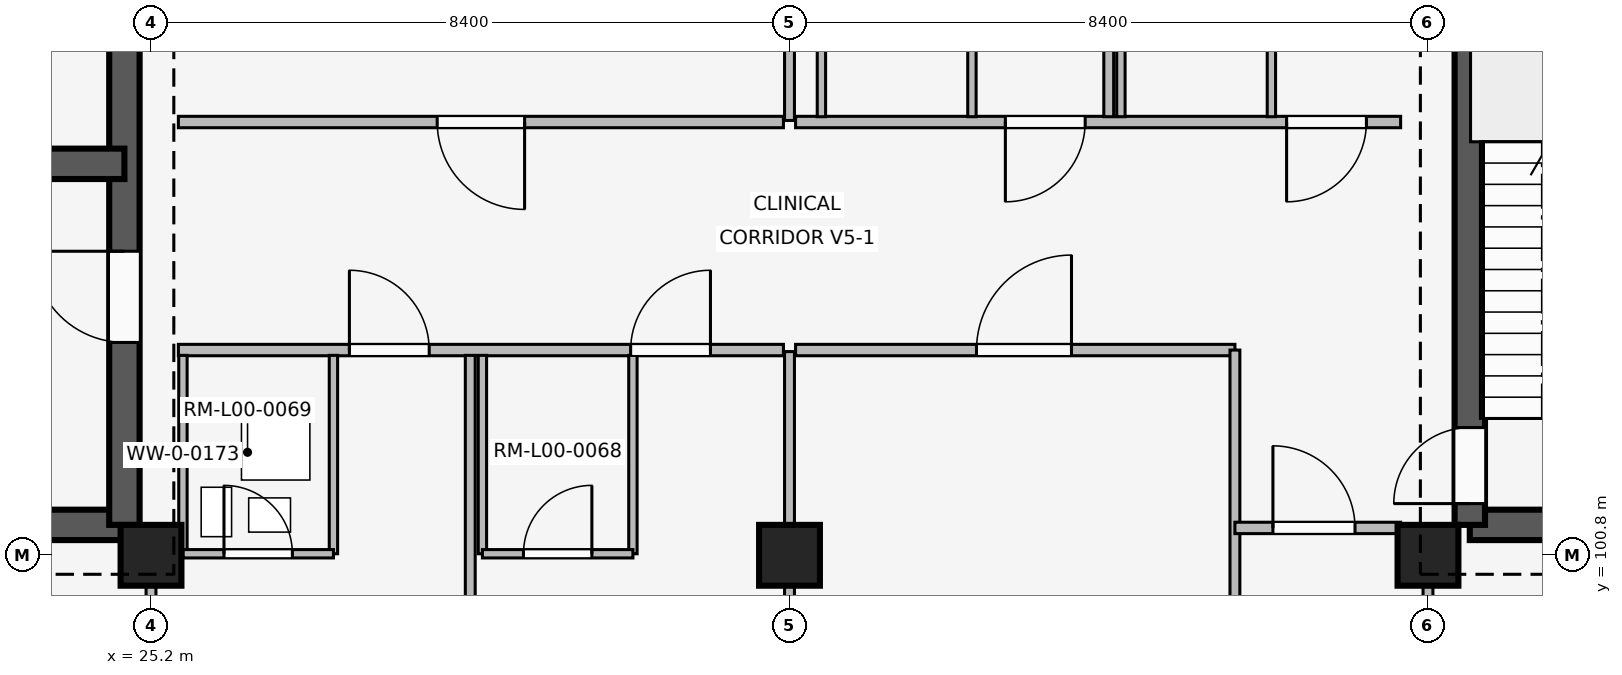
"""IFC4 building model, lengths in metres.
Left out: names, types, materials, properties, quantities, classifications, styles, units other than length and angle.
Written with IfcOpenShell. Run it as: python <this file> out.ifc"""

import sys

from ifc_helpers import new_model, si_unit, direction, frame, frame_2d, origin, origin_2d, place, context, subcontext, project, spatial, rectangle, extrude, element, fill, save


model = new_model("IFC4")
c1 = context("Model", 3, precision=1e-05, world=origin(), true_north=direction((0.0, 1.0)))
c2 = subcontext(c1, "Body", "Model", "MODEL_VIEW")
j1 = project(units=[si_unit("LENGTHUNIT", "METRE"), si_unit("PLANEANGLEUNIT", "RADIAN")], contexts=[c1])
p1 = place(None, origin())
s1 = spatial("IfcSite", under=j1, at=p1, CompositionType="ELEMENT")
p2 = place(p1, origin())
s2 = spatial("IfcBuilding", under=s1, at=p2, CompositionType="ELEMENT")
p3 = place(p2, origin())
s3 = spatial("IfcBuildingStorey", under=s2, at=p3, CompositionType="ELEMENT", Elevation=0.0)
for number, where, z_axis, x_axis in (
    (1, (25.2, 100.8, 0.0), (0.0, 0.0, 1.0), (1.0, 0.0, 0.0)),
    (2, (33.6, 100.8, 0.0), (0.0, 0.0, 1.0), (1.0, 0.0, 0.0)),
    (3, (42.0, 100.8, 0.0), (0.0, 0.0, 1.0), (1.0, 0.0, 0.0)),
):
    element("IfcColumn", number, at=place(p3, frame(where, z_axis=z_axis, x_axis=x_axis)), inside=s3, PredefinedType="COLUMN", context=c2, shape_type="SweptSolid", body=[
        extrude(rectangle(XDim=0.8, YDim=0.8, at=origin_2d()), origin(), (0.0, 0.0, 1.0), 4.8),
    ])
p4 = place(p3, frame((42.55, 101.2, 0.0), z_axis=(0.0, 0.0, 1.0), x_axis=(1.0, 0.0, 0.0)))
e4 = element("IfcWall", 4, at=p4, inside=s3, PredefinedType="SHEAR", context=c2, shape_type="SweptSolid", body=[
    extrude(rectangle(XDim=7.5, YDim=0.4, at=frame_2d((3.75, 0.0))), origin(), (0.0, 0.0, 1.0), 4.52),
])
p5 = place(p4, frame((4.85, 0.0, 0.0)))
e5 = element("IfcOpeningElement", 5, at=p5, cuts=e4, PredefinedType="OPENING", context=c2, shape_type="SweptSolid", body=[
    extrude(rectangle(XDim=1.2, YDim=2.2, at=frame_2d((0.6, 1.1))), frame((0.0, 0.21, 0.0), z_axis=(0.0, -1.0, 0.0), x_axis=(1.0, 0.0, 0.0)), (0.0, 0.0, 1.0), 0.42),
])
p6 = place(p3, frame((42.55, 101.2, 0.0), z_axis=(0.0, 0.0, 1.0), x_axis=(0.0, 1.0, 0.0)))
e6 = element("IfcWall", 6, at=p6, inside=s3, PredefinedType="SHEAR", context=c2, shape_type="SweptSolid", body=[
    extrude(rectangle(XDim=7.55, YDim=0.4, at=frame_2d((3.775, 0.0))), origin(), (0.0, 0.0, 1.0), 4.52),
])
p7 = place(p6, frame((0.28, 0.0, 0.0)))
e7 = element("IfcOpeningElement", 7, at=p7, cuts=e6, PredefinedType="OPENING", context=c2, shape_type="SweptSolid", body=[
    extrude(rectangle(XDim=1.0, YDim=2.15, at=frame_2d((0.5, 1.075))), frame((0.0, 0.21, 0.0), z_axis=(0.0, -1.0, 0.0), x_axis=(1.0, 0.0, 0.0)), (0.0, 0.0, 1.0), 0.42),
])
p8 = place(p3, frame((17.35, 101.2, 0.0), z_axis=(0.0, 0.0, 1.0), x_axis=(1.0, 0.0, 0.0)))
e8 = element("IfcWall", 8, at=p8, inside=s3, PredefinedType="SHEAR", context=c2, shape_type="SweptSolid", body=[
    extrude(rectangle(XDim=7.5, YDim=0.4, at=frame_2d((3.75, 0.0))), origin(), (0.0, 0.0, 1.0), 4.52),
])
p9 = place(p8, frame((4.85, 0.0, 0.0)))
e9 = element("IfcOpeningElement", 9, at=p9, cuts=e8, PredefinedType="OPENING", context=c2, shape_type="SweptSolid", body=[
    extrude(rectangle(XDim=1.2, YDim=2.2, at=frame_2d((0.6, 1.1))), frame((0.0, 0.21, 0.0), z_axis=(0.0, -1.0, 0.0), x_axis=(1.0, 0.0, 0.0)), (0.0, 0.0, 1.0), 0.42),
])
p10 = place(p3, frame((24.85, 101.2, 0.0), z_axis=(0.0, 0.0, 1.0), x_axis=(0.0, 1.0, 0.0)))
e10 = element("IfcWall", 10, at=p10, inside=s3, PredefinedType="SHEAR", context=c2, shape_type="SweptSolid", body=[
    extrude(rectangle(XDim=7.55, YDim=0.4, at=frame_2d((3.775, 0.0))), origin(), (0.0, 0.0, 1.0), 4.52),
])
p11 = place(p10, frame((2.4, 0.0, 0.0)))
e11 = element("IfcOpeningElement", 11, at=p11, cuts=e10, PredefinedType="OPENING", context=c2, shape_type="SweptSolid", body=[
    extrude(rectangle(XDim=1.2, YDim=2.2, at=frame_2d((0.6, 1.1))), frame((0.0, 0.21, 0.0), z_axis=(0.0, -1.0, 0.0), x_axis=(1.0, 0.0, 0.0)), (0.0, 0.0, 1.0), 0.42),
])
p12 = place(p3, frame((21.05, 105.95, 0.0), z_axis=(0.0, 0.0, 1.0), x_axis=(1.0, 0.0, 0.0)))
e12 = element("IfcWall", 12, at=p12, inside=s3, PredefinedType="SHEAR", context=c2, shape_type="SweptSolid", body=[
    extrude(rectangle(XDim=3.8, YDim=0.4, at=frame_2d((1.9, 0.0))), origin(), (0.0, 0.0, 1.0), 4.52),
])
p13 = place(p12, frame((0.32, 0.0, 0.0)))
e13 = element("IfcOpeningElement", 13, at=p13, cuts=e12, PredefinedType="OPENING", context=c2, shape_type="SweptSolid", body=[
    extrude(rectangle(XDim=1.1, YDim=2.15, at=frame_2d((0.55, 1.075))), frame((0.0, 0.21, 0.0), z_axis=(0.0, -1.0, 0.0), x_axis=(1.0, 0.0, 0.0)), (0.0, 0.0, 1.0), 0.42),
])
p14 = place(p3, frame((25.2, 92.54, 0.0), z_axis=(0.0, 0.0, 1.0), x_axis=(0.0, 1.0, 0.0)))
e14 = element("IfcWall", 14, at=p14, inside=s3, PredefinedType="PARTITIONING", context=c2, shape_type="SweptSolid", body=[
    extrude(rectangle(XDim=8.21, YDim=0.13, at=frame_2d((4.105, 0.0))), origin(), (0.0, 0.0, 1.0), 3.8),
])
p15 = place(p14, frame((3.64, 0.0, 0.0)))
e15 = element("IfcOpeningElement", 15, at=p15, cuts=e14, PredefinedType="OPENING", context=c2, shape_type="SweptSolid", body=[
    extrude(rectangle(XDim=1.08, YDim=2.15, at=frame_2d((0.54, 1.075))), frame((0.0, 0.075, 0.0), z_axis=(0.0, -1.0, 0.0), x_axis=(1.0, 0.0, 0.0)), (0.0, 0.0, 1.0), 0.15),
])
p16 = place(p3, frame((25.56, 103.5, 0.0), z_axis=(0.0, 0.0, 1.0), x_axis=(1.0, 0.0, 0.0)))
e16 = element("IfcWall", 16, at=p16, inside=s3, PredefinedType="PARTITIONING", context=c2, shape_type="SweptSolid", body=[
    extrude(rectangle(XDim=7.96, YDim=0.15, at=frame_2d((3.98, 0.0))), origin(), (0.0, 0.0, 1.0), 3.8),
])
p17 = place(p16, frame((2.25, 0.0, 0.0)))
e17 = element("IfcOpeningElement", 17, at=p17, cuts=e16, PredefinedType="OPENING", context=c2, shape_type="SweptSolid", body=[
    extrude(rectangle(XDim=1.05, YDim=2.2, at=frame_2d((0.525, 1.1))), frame((0.0, 0.085, 0.0), z_axis=(0.0, -1.0, 0.0), x_axis=(1.0, 0.0, 0.0)), (0.0, 0.0, 1.0), 0.17),
])
p18 = place(p16, frame((5.95, 0.0, 0.0)))
e18 = element("IfcOpeningElement", 18, at=p18, cuts=e16, PredefinedType="OPENING", context=c2, shape_type="SweptSolid", body=[
    extrude(rectangle(XDim=1.05, YDim=2.2, at=frame_2d((0.525, 1.1))), frame((0.0, 0.085, 0.0), z_axis=(0.0, -1.0, 0.0), x_axis=(1.0, 0.0, 0.0)), (0.0, 0.0, 1.0), 0.17),
])
p19 = place(p3, frame((29.4, 92.5, 0.0), z_axis=(0.0, 0.0, 1.0), x_axis=(0.0, 1.0, 0.0)))
e19 = element("IfcWall", 19, at=p19, inside=s3, PredefinedType="PARTITIONING", context=c2, shape_type="SweptSolid", body=[
    extrude(rectangle(XDim=10.93, YDim=0.13, at=frame_2d((5.465, 0.0))), origin(), (0.0, 0.0, 1.0), 3.8),
])
for number, where, z_axis, x_axis in (
    (20, (25.62, 100.82, 0.0), (0.0, 0.0, 1.0), (0.0, 1.0, 0.0)),
    (21, (27.6, 100.82, 0.0), (0.0, 0.0, 1.0), (0.0, 1.0, 0.0)),
):
    element("IfcWall", number, at=place(p3, frame(where, z_axis=z_axis, x_axis=x_axis)), inside=s3, PredefinedType="PARTITIONING", context=c2, shape_type="SweptSolid", body=[
        extrude(rectangle(XDim=2.61, YDim=0.11, at=frame_2d((1.305, 0.0))), origin(), (0.0, 0.0, 1.0), 3.8),
    ])
p20 = place(p3, frame((25.62, 100.82, 0.0), z_axis=(0.0, 0.0, 1.0), x_axis=(1.0, 0.0, 0.0)))
e22 = element("IfcWall", 22, at=p20, inside=s3, PredefinedType="PARTITIONING", context=c2, shape_type="SweptSolid", body=[
    extrude(rectangle(XDim=1.98, YDim=0.11, at=frame_2d((0.99, 0.0))), origin(), (0.0, 0.0, 1.0), 3.8),
])
p21 = place(p20, frame((0.54, 0.0, 0.0)))
e23 = element("IfcOpeningElement", 23, at=p21, cuts=e22, PredefinedType="OPENING", context=c2, shape_type="SweptSolid", body=[
    extrude(rectangle(XDim=0.9, YDim=2.1, at=frame_2d((0.45, 1.05))), frame((0.0, 0.065, 0.0), z_axis=(0.0, -1.0, 0.0), x_axis=(1.0, 0.0, 0.0)), (0.0, 0.0, 1.0), 0.13),
])
for number, where, z_axis, x_axis in (
    (24, (29.56, 100.82, 0.0), (0.0, 0.0, 1.0), (0.0, 1.0, 0.0)),
    (25, (31.54, 100.82, 0.0), (0.0, 0.0, 1.0), (0.0, 1.0, 0.0)),
):
    element("IfcWall", number, at=place(p3, frame(where, z_axis=z_axis, x_axis=x_axis)), inside=s3, PredefinedType="PARTITIONING", context=c2, shape_type="SweptSolid", body=[
        extrude(rectangle(XDim=2.61, YDim=0.11, at=frame_2d((1.305, 0.0))), origin(), (0.0, 0.0, 1.0), 3.8),
    ])
p22 = place(p3, frame((29.56, 100.82, 0.0), z_axis=(0.0, 0.0, 1.0), x_axis=(1.0, 0.0, 0.0)))
e26 = element("IfcWall", 26, at=p22, inside=s3, PredefinedType="PARTITIONING", context=c2, shape_type="SweptSolid", body=[
    extrude(rectangle(XDim=1.98, YDim=0.11, at=frame_2d((0.99, 0.0))), origin(), (0.0, 0.0, 1.0), 3.8),
])
p23 = place(p22, frame((0.54, 0.0, 0.0)))
e27 = element("IfcOpeningElement", 27, at=p23, cuts=e26, PredefinedType="OPENING", context=c2, shape_type="SweptSolid", body=[
    extrude(rectangle(XDim=0.9, YDim=2.1, at=frame_2d((0.45, 1.05))), frame((0.0, 0.065, 0.0), z_axis=(0.0, -1.0, 0.0), x_axis=(1.0, 0.0, 0.0)), (0.0, 0.0, 1.0), 0.13),
])
p24 = place(p3, frame((33.52, 106.5, 0.0), z_axis=(0.0, 0.0, 1.0), x_axis=(-1.0, 0.0, 0.0)))
e28 = element("IfcWall", 28, at=p24, inside=s3, PredefinedType="PARTITIONING", context=c2, shape_type="SweptSolid", body=[
    extrude(rectangle(XDim=7.96, YDim=0.15, at=frame_2d((3.98, 0.0))), origin(), (0.0, 0.0, 1.0), 3.8),
])
p25 = place(p24, frame((3.405, 0.0, 0.0)))
e29 = element("IfcOpeningElement", 29, at=p25, cuts=e28, PredefinedType="OPENING", context=c2, shape_type="SweptSolid", body=[
    extrude(rectangle(XDim=1.15, YDim=2.2, at=frame_2d((0.575, 1.1))), frame((0.0, 0.085, 0.0), z_axis=(0.0, -1.0, 0.0), x_axis=(1.0, 0.0, 0.0)), (0.0, 0.0, 1.0), 0.17),
])
for number, where, z_axis, x_axis in (
    (30, (33.6, 92.54, 0.0), (0.0, 0.0, 1.0), (0.0, 1.0, 0.0)),
    (31, (33.6, 106.52, 0.0), (0.0, 0.0, 1.0), (0.0, 1.0, 0.0)),
):
    element("IfcWall", number, at=place(p3, frame(where, z_axis=z_axis, x_axis=x_axis)), inside=s3, PredefinedType="PARTITIONING", context=c2, shape_type="SweptSolid", body=[
        extrude(rectangle(XDim=10.94, YDim=0.13, at=frame_2d((5.47, 0.0))), origin(), (0.0, 0.0, 1.0), 3.8),
    ])
p26 = place(p3, frame((33.68, 103.5, 0.0), z_axis=(0.0, 0.0, 1.0), x_axis=(1.0, 0.0, 0.0)))
e32 = element("IfcWall", 32, at=p26, inside=s3, PredefinedType="PARTITIONING", context=c2, shape_type="SweptSolid", body=[
    extrude(rectangle(XDim=5.78, YDim=0.15, at=frame_2d((2.89, 0.0))), origin(), (0.0, 0.0, 1.0), 3.8),
])
p27 = place(p26, frame((2.38, 0.0, 0.0)))
e33 = element("IfcOpeningElement", 33, at=p27, cuts=e32, PredefinedType="OPENING", context=c2, shape_type="SweptSolid", body=[
    extrude(rectangle(XDim=1.25, YDim=2.2, at=frame_2d((0.625, 1.1))), frame((0.0, 0.085, 0.0), z_axis=(0.0, -1.0, 0.0), x_axis=(1.0, 0.0, 0.0)), (0.0, 0.0, 1.0), 0.17),
])
p28 = place(p3, frame((39.46, 92.56, 0.0), z_axis=(0.0, 0.0, 1.0), x_axis=(0.0, 1.0, 0.0)))
e34 = element("IfcWall", 34, at=p28, inside=s3, PredefinedType="PARTITIONING", context=c2, shape_type="SweptSolid", body=[
    extrude(rectangle(XDim=10.94, YDim=0.13, at=frame_2d((5.47, 0.0))), origin(), (0.0, 0.0, 1.0), 3.8),
])
p29 = place(p3, frame((39.46, 101.16, 0.0), z_axis=(0.0, 0.0, 1.0), x_axis=(1.0, 0.0, 0.0)))
e35 = element("IfcWall", 35, at=p29, inside=s3, PredefinedType="PARTITIONING", context=c2, shape_type="SweptSolid", body=[
    extrude(rectangle(XDim=2.18, YDim=0.15, at=frame_2d((1.09, 0.0))), origin(), (0.0, 0.0, 1.0), 3.8),
])
p30 = place(p29, frame((0.5, 0.0, 0.0)))
e36 = element("IfcOpeningElement", 36, at=p30, cuts=e35, PredefinedType="OPENING", context=c2, shape_type="SweptSolid", body=[
    extrude(rectangle(XDim=1.08, YDim=2.15, at=frame_2d((0.54, 1.075))), frame((0.0, 0.085, 0.0), z_axis=(0.0, -1.0, 0.0), x_axis=(1.0, 0.0, 0.0)), (0.0, 0.0, 1.0), 0.17),
])
p31 = place(p3, frame((41.64, 106.5, 0.0), z_axis=(0.0, 0.0, 1.0), x_axis=(-1.0, 0.0, 0.0)))
e37 = element("IfcWall", 37, at=p31, inside=s3, PredefinedType="PARTITIONING", context=c2, shape_type="SweptSolid", body=[
    extrude(rectangle(XDim=7.96, YDim=0.15, at=frame_2d((3.98, 0.0))), origin(), (0.0, 0.0, 1.0), 3.8),
])
p32 = place(p31, frame((0.45, 0.0, 0.0)))
e38 = element("IfcOpeningElement", 38, at=p32, cuts=e37, PredefinedType="OPENING", context=c2, shape_type="SweptSolid", body=[
    extrude(rectangle(XDim=1.05, YDim=2.2, at=frame_2d((0.525, 1.1))), frame((0.0, 0.085, 0.0), z_axis=(0.0, -1.0, 0.0), x_axis=(1.0, 0.0, 0.0)), (0.0, 0.0, 1.0), 0.17),
])
p33 = place(p31, frame((4.15, 0.0, 0.0)))
e39 = element("IfcOpeningElement", 39, at=p33, cuts=e37, PredefinedType="OPENING", context=c2, shape_type="SweptSolid", body=[
    extrude(rectangle(XDim=1.05, YDim=2.2, at=frame_2d((0.525, 1.1))), frame((0.0, 0.085, 0.0), z_axis=(0.0, -1.0, 0.0), x_axis=(1.0, 0.0, 0.0)), (0.0, 0.0, 1.0), 0.17),
])
p34 = place(p3, frame((37.8, 106.57, 0.0), z_axis=(0.0, 0.0, 1.0), x_axis=(0.0, 1.0, 0.0)))
e40 = element("IfcWall", 40, at=p34, inside=s3, PredefinedType="PARTITIONING", context=c2, shape_type="SweptSolid", body=[
    extrude(rectangle(XDim=10.93, YDim=0.13, at=frame_2d((5.465, 0.0))), origin(), (0.0, 0.0, 1.0), 3.8),
])
for number, where, z_axis, x_axis in (
    (41, (34.02, 106.57, 0.0), (0.0, 0.0, 1.0), (0.0, 1.0, 0.0)),
    (42, (36.0, 106.57, 0.0), (0.0, 0.0, 1.0), (0.0, 1.0, 0.0)),
    (43, (37.96, 106.57, 0.0), (0.0, 0.0, 1.0), (0.0, 1.0, 0.0)),
    (44, (39.94, 106.57, 0.0), (0.0, 0.0, 1.0), (0.0, 1.0, 0.0)),
):
    element("IfcWall", number, at=place(p3, frame(where, z_axis=z_axis, x_axis=x_axis)), inside=s3, PredefinedType="PARTITIONING", context=c2, shape_type="SweptSolid", body=[
        extrude(rectangle(XDim=2.61, YDim=0.11, at=frame_2d((1.305, 0.0))), origin(), (0.0, 0.0, 1.0), 3.8),
    ])
p35 = place(p3, frame((42.0, 92.54, 0.0), z_axis=(0.0, 0.0, 1.0), x_axis=(0.0, 1.0, 0.0)))
e45 = element("IfcWall", 45, at=p35, inside=s3, PredefinedType="PARTITIONING", context=c2, shape_type="SweptSolid", body=[
    extrude(rectangle(XDim=8.21, YDim=0.13, at=frame_2d((4.105, 0.0))), origin(), (0.0, 0.0, 1.0), 3.8),
])
p36 = place(p35, frame((3.64, 0.0, 0.0)))
e46 = element("IfcOpeningElement", 46, at=p36, cuts=e45, PredefinedType="OPENING", context=c2, shape_type="SweptSolid", body=[
    extrude(rectangle(XDim=1.08, YDim=2.15, at=frame_2d((0.54, 1.075))), frame((0.0, 0.075, 0.0), z_axis=(0.0, -1.0, 0.0), x_axis=(1.0, 0.0, 0.0)), (0.0, 0.0, 1.0), 0.15),
])
p37 = place(p7, origin())
e47 = element("IfcDoor", 47, at=p37, inside=s3, OperationType="SINGLE_SWING_LEFT", PredefinedType="DOOR", context=c2, shape_type="SweptSolid", body=[
    extrude(rectangle(XDim=1.0, YDim=2.15, at=frame_2d((0.5, 1.075))), frame((0.0, 0.025, 0.0), z_axis=(0.0, -1.0, 0.0), x_axis=(1.0, 0.0, 0.0)), (0.0, 0.0, 1.0), 0.05),
])
fill(e7, e47)
p38 = place(p11, origin())
e48 = element("IfcDoor", 48, at=p38, inside=s3, OperationType="SINGLE_SWING_RIGHT", PredefinedType="DOOR", context=c2, shape_type="SweptSolid", body=[
    extrude(rectangle(XDim=1.2, YDim=2.2, at=frame_2d((0.6, 1.1))), frame((0.0, 0.025, 0.0), z_axis=(0.0, -1.0, 0.0), x_axis=(1.0, 0.0, 0.0)), (0.0, 0.0, 1.0), 0.05),
])
fill(e11, e48)
p39 = place(p17, origin())
e49 = element("IfcDoor", 49, at=p39, inside=s3, OperationType="SINGLE_SWING_LEFT", PredefinedType="DOOR", context=c2, shape_type="SweptSolid", body=[
    extrude(rectangle(XDim=1.05, YDim=2.2, at=frame_2d((0.525, 1.1))), frame((0.0, 0.025, 0.0), z_axis=(0.0, -1.0, 0.0), x_axis=(1.0, 0.0, 0.0)), (0.0, 0.0, 1.0), 0.05),
])
fill(e17, e49)
p40 = place(p18, origin())
e50 = element("IfcDoor", 50, at=p40, inside=s3, OperationType="SINGLE_SWING_RIGHT", PredefinedType="DOOR", context=c2, shape_type="SweptSolid", body=[
    extrude(rectangle(XDim=1.05, YDim=2.2, at=frame_2d((0.525, 1.1))), frame((0.0, 0.025, 0.0), z_axis=(0.0, -1.0, 0.0), x_axis=(1.0, 0.0, 0.0)), (0.0, 0.0, 1.0), 0.05),
])
fill(e18, e50)
p41 = place(p21, origin())
e51 = element("IfcDoor", 51, at=p41, inside=s3, OperationType="SINGLE_SWING_LEFT", PredefinedType="DOOR", context=c2, shape_type="SweptSolid", body=[
    extrude(rectangle(XDim=0.9, YDim=2.1, at=frame_2d((0.45, 1.05))), frame((0.0, 0.025, 0.0), z_axis=(0.0, -1.0, 0.0), x_axis=(1.0, 0.0, 0.0)), (0.0, 0.0, 1.0), 0.05),
])
fill(e23, e51)
p42 = place(p23, origin())
e52 = element("IfcDoor", 52, at=p42, inside=s3, OperationType="SINGLE_SWING_RIGHT", PredefinedType="DOOR", context=c2, shape_type="SweptSolid", body=[
    extrude(rectangle(XDim=0.9, YDim=2.1, at=frame_2d((0.45, 1.05))), frame((0.0, 0.025, 0.0), z_axis=(0.0, -1.0, 0.0), x_axis=(1.0, 0.0, 0.0)), (0.0, 0.0, 1.0), 0.05),
])
fill(e27, e52)
p43 = place(p25, origin())
e53 = element("IfcDoor", 53, at=p43, inside=s3, OperationType="SINGLE_SWING_LEFT", PredefinedType="DOOR", context=c2, shape_type="SweptSolid", body=[
    extrude(rectangle(XDim=1.15, YDim=2.2, at=frame_2d((0.575, 1.1))), frame((0.0, 0.025, 0.0), z_axis=(0.0, -1.0, 0.0), x_axis=(1.0, 0.0, 0.0)), (0.0, 0.0, 1.0), 0.05),
])
fill(e29, e53)
p44 = place(p27, origin())
e54 = element("IfcDoor", 54, at=p44, inside=s3, OperationType="SINGLE_SWING_RIGHT", PredefinedType="DOOR", context=c2, shape_type="SweptSolid", body=[
    extrude(rectangle(XDim=1.25, YDim=2.2, at=frame_2d((0.625, 1.1))), frame((0.0, 0.025, 0.0), z_axis=(0.0, -1.0, 0.0), x_axis=(1.0, 0.0, 0.0)), (0.0, 0.0, 1.0), 0.05),
])
fill(e33, e54)
p45 = place(p30, origin())
e55 = element("IfcDoor", 55, at=p45, inside=s3, OperationType="SINGLE_SWING_LEFT", PredefinedType="DOOR", context=c2, shape_type="SweptSolid", body=[
    extrude(rectangle(XDim=1.08, YDim=2.15, at=frame_2d((0.54, 1.075))), frame((0.0, 0.025, 0.0), z_axis=(0.0, -1.0, 0.0), x_axis=(1.0, 0.0, 0.0)), (0.0, 0.0, 1.0), 0.05),
])
fill(e36, e55)
p46 = place(p32, origin())
e56 = element("IfcDoor", 56, at=p46, inside=s3, OperationType="SINGLE_SWING_RIGHT", PredefinedType="DOOR", context=c2, shape_type="SweptSolid", body=[
    extrude(rectangle(XDim=1.05, YDim=2.2, at=frame_2d((0.525, 1.1))), frame((0.0, 0.025, 0.0), z_axis=(0.0, -1.0, 0.0), x_axis=(1.0, 0.0, 0.0)), (0.0, 0.0, 1.0), 0.05),
])
fill(e38, e56)
p47 = place(p33, origin())
e57 = element("IfcDoor", 57, at=p47, inside=s3, OperationType="SINGLE_SWING_RIGHT", PredefinedType="DOOR", context=c2, shape_type="SweptSolid", body=[
    extrude(rectangle(XDim=1.05, YDim=2.2, at=frame_2d((0.525, 1.1))), frame((0.0, 0.025, 0.0), z_axis=(0.0, -1.0, 0.0), x_axis=(1.0, 0.0, 0.0)), (0.0, 0.0, 1.0), 0.05),
])
fill(e39, e57)
save(model, sys.argv[1])
